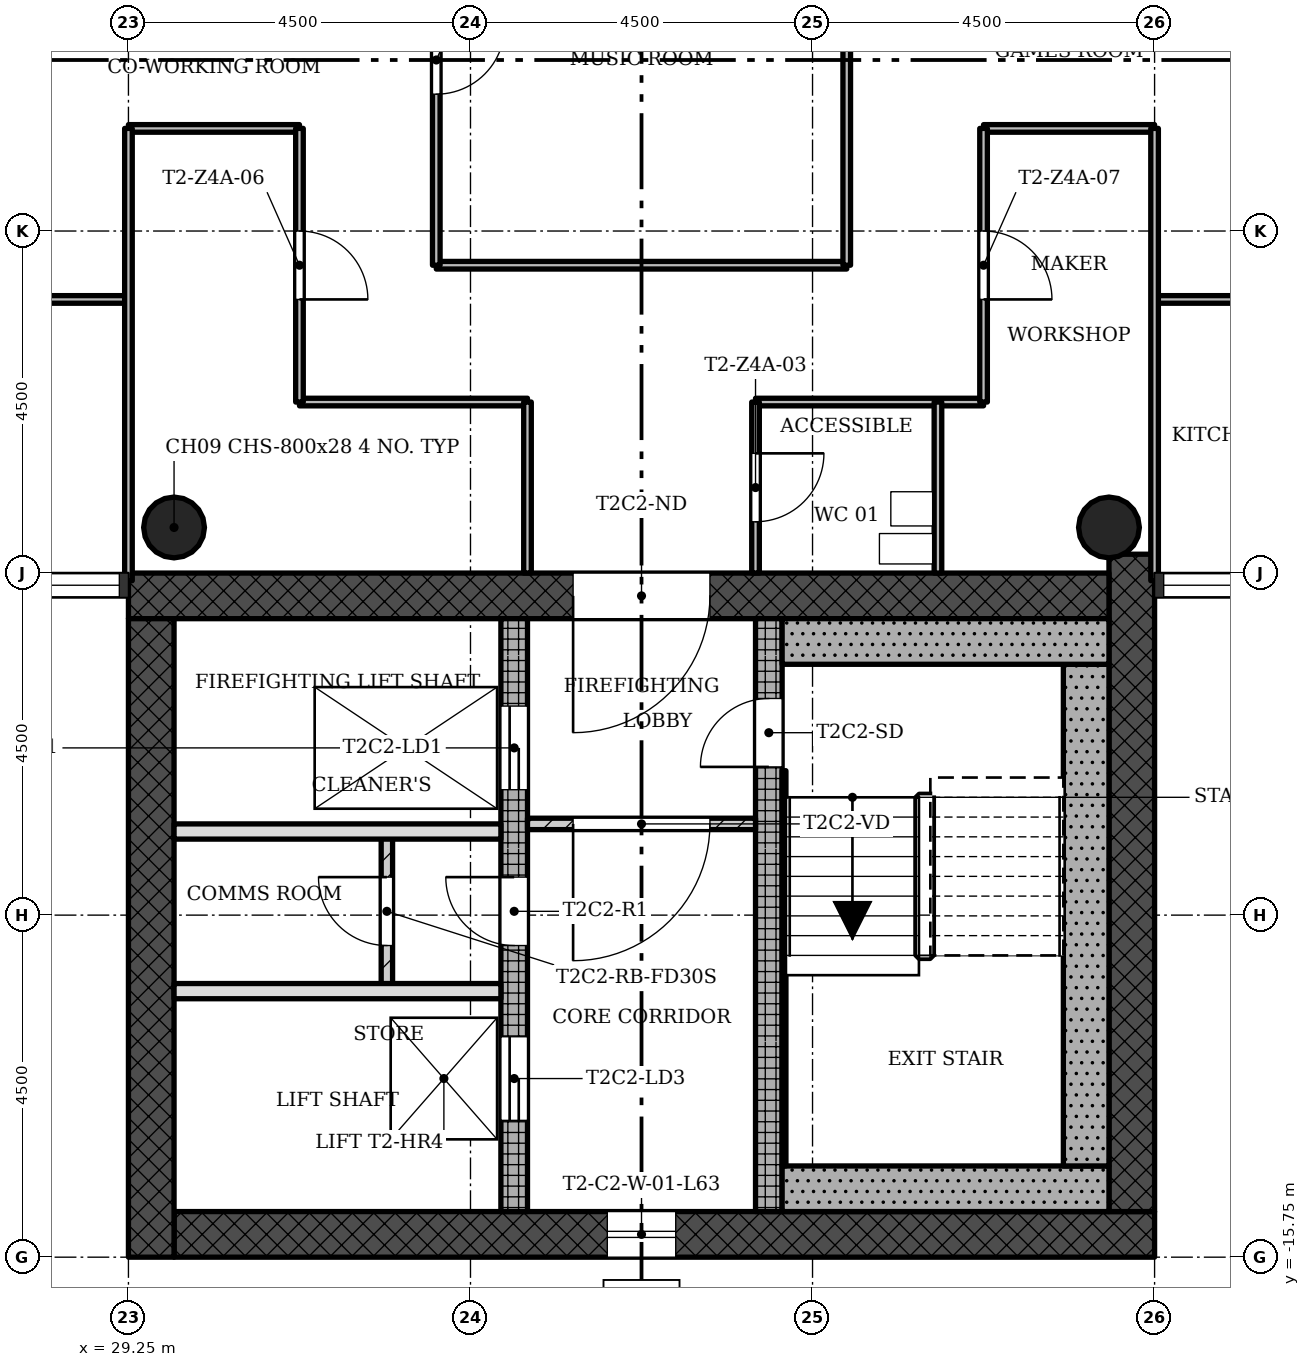
"""IFC4 building model, lengths in metres.
Left out: names, types, materials, properties, quantities, classifications, styles, units other than length and angle.
Written with IfcOpenShell. Run it as: python <this file> out.ifc"""

import sys

from ifc_helpers import new_model, si_unit, direction, frame, frame_2d, origin, origin_2d, place, context, subcontext, project, spatial, rectangle, hollow_circle, extrude, element, fill, save


model = new_model("IFC4")
c1 = context("Model", 3, precision=1e-05, world=origin(), true_north=direction((0.0, 1.0)))
c2 = subcontext(c1, "Body", "Model", "MODEL_VIEW")
j1 = project(units=[si_unit("LENGTHUNIT", "METRE"), si_unit("PLANEANGLEUNIT", "RADIAN")], contexts=[c1])
p1 = place(None, origin())
s1 = spatial("IfcSite", under=j1, at=p1, CompositionType="ELEMENT")
p2 = place(p1, origin())
s2 = spatial("IfcBuilding", under=s1, at=p2, CompositionType="ELEMENT")
p3 = place(p2, frame((0.0, 0.0, 226.6)))
s3 = spatial("IfcBuildingStorey", under=s2, at=p3, CompositionType="ELEMENT", Elevation=226.6)
p4 = place(p3, frame((29.85, -15.45, 0.0), z_axis=(0.0, 0.0, 1.0), x_axis=(1.0, 0.0, 0.0)))
e1 = element("IfcWall", 1, at=p4, inside=s3, PredefinedType="SHEAR", context=c2, shape_type="SweptSolid", body=[
    extrude(rectangle(XDim=12.9, YDim=0.6, at=frame_2d((6.45, 0.0))), origin(), (0.0, 0.0, 1.0), 3.4),
])
p5 = place(p4, frame((5.7, 0.0, 0.45)))
e2 = element("IfcOpeningElement", 2, at=p5, cuts=e1, PredefinedType="OPENING", context=c2, shape_type="SweptSolid", body=[
    extrude(rectangle(XDim=0.9, YDim=2.4, at=frame_2d((0.45, 1.2))), frame((0.0, 0.31, 0.0), z_axis=(0.0, -1.0, 0.0), x_axis=(1.0, 0.0, 0.0)), (0.0, 0.0, 1.0), 0.62),
])
p6 = place(p3, frame((42.45, -15.15, 0.0), z_axis=(0.0, 0.0, 1.0), x_axis=(0.0, 1.0, 0.0)))
e3 = element("IfcWall", 3, at=p6, inside=s3, PredefinedType="SHEAR", context=c2, shape_type="SweptSolid", body=[
    extrude(rectangle(XDim=8.648, YDim=0.6, at=frame_2d((4.324, 0.0))), origin(), (0.0, 0.0, 1.0), 3.4),
])
p7 = place(p3, frame((42.15, -7.05, 0.0), z_axis=(0.0, 0.0, 1.0), x_axis=(-1.0, 0.0, 0.0)))
e4 = element("IfcWall", 4, at=p7, inside=s3, PredefinedType="SHEAR", context=c2, shape_type="SweptSolid", body=[
    extrude(rectangle(XDim=12.9, YDim=0.6, at=frame_2d((6.45, 0.0))), origin(), (0.0, 0.0, 1.0), 3.4),
])
p8 = place(p7, frame((5.25, 0.0, 0.0)))
e5 = element("IfcOpeningElement", 5, at=p8, cuts=e4, PredefinedType="OPENING", context=c2, shape_type="SweptSolid", body=[
    extrude(rectangle(XDim=1.8, YDim=2.1, at=frame_2d((0.9, 1.05))), frame((0.0, 0.31, 0.0), z_axis=(0.0, -1.0, 0.0), x_axis=(1.0, 0.0, 0.0)), (0.0, 0.0, 1.0), 0.62),
])
p9 = place(p3, frame((29.55, -7.35, 0.0), z_axis=(0.0, 0.0, 1.0), x_axis=(0.0, -1.0, 0.0)))
e6 = element("IfcWall", 6, at=p9, inside=s3, PredefinedType="SHEAR", context=c2, shape_type="SweptSolid", body=[
    extrude(rectangle(XDim=8.4, YDim=0.6, at=frame_2d((4.2, 0.0))), origin(), (0.0, 0.0, 1.0), 3.4),
])
p10 = place(p3, frame((34.325, -15.15, 0.0), z_axis=(0.0, 0.0, 1.0), x_axis=(0.0, 1.0, 0.0)))
e7 = element("IfcWall", 7, at=p10, inside=s3, PredefinedType="SHEAR", context=c2, shape_type="SweptSolid", body=[
    extrude(rectangle(XDim=7.8, YDim=0.35, at=frame_2d((3.9, 0.0))), origin(), (0.0, 0.0, 1.0), 3.4),
])
p11 = place(p10, frame((5.55, 0.0, 0.0)))
e8 = element("IfcOpeningElement", 8, at=p11, cuts=e7, PredefinedType="OPENING", context=c2, shape_type="SweptSolid", body=[
    extrude(rectangle(XDim=1.1, YDim=2.1, at=frame_2d((0.55, 1.05))), frame((0.0, 0.185, 0.0), z_axis=(0.0, -1.0, 0.0), x_axis=(1.0, 0.0, 0.0)), (0.0, 0.0, 1.0), 0.37),
])
p12 = place(p10, frame((1.2, 0.0, 0.0)))
e9 = element("IfcOpeningElement", 9, at=p12, cuts=e7, PredefinedType="OPENING", context=c2, shape_type="SweptSolid", body=[
    extrude(rectangle(XDim=1.1, YDim=2.1, at=frame_2d((0.55, 1.05))), frame((0.0, 0.185, 0.0), z_axis=(0.0, -1.0, 0.0), x_axis=(1.0, 0.0, 0.0)), (0.0, 0.0, 1.0), 0.37),
])
p13 = place(p10, frame((3.5, 0.0, 0.0)))
e10 = element("IfcOpeningElement", 10, at=p13, cuts=e7, PredefinedType="OPENING", context=c2, shape_type="SweptSolid", body=[
    extrude(rectangle(XDim=0.9, YDim=2.1, at=frame_2d((0.45, 1.05))), frame((0.0, 0.185, 0.0), z_axis=(0.0, -1.0, 0.0), x_axis=(1.0, 0.0, 0.0)), (0.0, 0.0, 1.0), 0.37),
])
p14 = place(p3, frame((37.675, -15.15, 0.0), z_axis=(0.0, 0.0, 1.0), x_axis=(0.0, 1.0, 0.0)))
e11 = element("IfcWall", 11, at=p14, inside=s3, PredefinedType="SHEAR", context=c2, shape_type="SweptSolid", body=[
    extrude(rectangle(XDim=7.8, YDim=0.35, at=frame_2d((3.9, 0.0))), origin(), (0.0, 0.0, 1.0), 3.4),
])
p15 = place(p14, frame((5.85, 0.0, 0.0)))
e12 = element("IfcOpeningElement", 12, at=p15, cuts=e11, PredefinedType="OPENING", context=c2, shape_type="SweptSolid", body=[
    extrude(rectangle(XDim=0.9, YDim=2.1, at=frame_2d((0.45, 1.05))), frame((0.0, 0.185, 0.0), z_axis=(0.0, -1.0, 0.0), x_axis=(1.0, 0.0, 0.0)), (0.0, 0.0, 1.0), 0.37),
])
for number, where, z_axis, x_axis in (
    (13, (42.15, -6.15, 0.0), (0.0, 0.0, 1.0), (1.0, 0.0, 0.0)),
    (14, (29.85, -6.15, 0.0), (0.0, 0.0, 1.0), (1.0, 0.0, 0.0)),
):
    element("IfcColumn", number, at=place(p3, frame(where, z_axis=z_axis, x_axis=x_axis)), inside=s3, PredefinedType="COLUMN", context=c2, shape_type="SweptSolid", body=[
        extrude(hollow_circle(Radius=0.4, WallThickness=0.028, at=origin_2d()), origin(), (0.0, 0.0, 1.0), 3.4),
    ])
p16 = place(p3, frame((34.5, -10.05, 0.0), z_axis=(0.0, 0.0, 1.0), x_axis=(1.0, 0.0, 0.0)))
e15 = element("IfcWall", 15, at=p16, inside=s3, PredefinedType="PARTITIONING", context=c2, shape_type="SweptSolid", body=[
    extrude(rectangle(XDim=3.0, YDim=0.15, at=frame_2d((1.5, 0.0))), origin(), (0.0, 0.0, 1.0), 3.0),
])
p17 = place(p16, frame((0.6, 0.0, 0.0)))
e16 = element("IfcOpeningElement", 16, at=p17, cuts=e15, PredefinedType="OPENING", context=c2, shape_type="SweptSolid", body=[
    extrude(rectangle(XDim=1.8, YDim=2.1, at=frame_2d((0.9, 1.05))), frame((0.0, 0.085, 0.0), z_axis=(0.0, -1.0, 0.0), x_axis=(1.0, 0.0, 0.0)), (0.0, 0.0, 1.0), 0.17),
])
for number, where, z_axis, x_axis in (
    (17, (29.85, -12.25, 0.0), (0.0, 0.0, 1.0), (1.0, 0.0, 0.0)),
    (18, (29.85, -10.15, 0.0), (0.0, 0.0, 1.0), (1.0, 0.0, 0.0)),
):
    element("IfcWall", number, at=place(p3, frame(where, z_axis=z_axis, x_axis=x_axis)), inside=s3, PredefinedType="SOLIDWALL", context=c2, shape_type="SweptSolid", body=[
        extrude(rectangle(XDim=4.3, YDim=0.2, at=frame_2d((2.15, 0.0))), origin(), (0.0, 0.0, 1.0), 3.0),
    ])
p18 = place(p3, frame((32.65, -10.15, 0.0), z_axis=(0.0, 0.0, 1.0), x_axis=(0.0, -1.0, 0.0)))
e19 = element("IfcWall", 19, at=p18, inside=s3, PredefinedType="PARTITIONING", context=c2, shape_type="SweptSolid", body=[
    extrude(rectangle(XDim=2.1, YDim=0.15, at=frame_2d((1.05, 0.0))), origin(), (0.0, 0.0, 1.0), 3.0),
])
p19 = place(p18, frame((0.6, 0.0, 0.0)))
e20 = element("IfcOpeningElement", 20, at=p19, cuts=e19, PredefinedType="OPENING", context=c2, shape_type="SweptSolid", body=[
    extrude(rectangle(XDim=0.9, YDim=2.1, at=frame_2d((0.45, 1.05))), frame((0.0, 0.085, 0.0), z_axis=(0.0, -1.0, 0.0), x_axis=(1.0, 0.0, 0.0)), (0.0, 0.0, 1.0), 0.17),
])
for number, where, z_axis, x_axis in (
    (21, (40.5, -4.5, 0.0), (0.0, 0.0, 1.0), (-1.0, 0.0, 0.0)),
    (22, (34.5, -4.5, 0.0), (0.0, 0.0, 1.0), (-1.0, 0.0, 0.0)),
):
    element("IfcWall", number, at=place(p3, frame(where, z_axis=z_axis, x_axis=x_axis)), inside=s3, PredefinedType="PARTITIONING", context=c2, shape_type="SweptSolid", body=[
        extrude(rectangle(XDim=3.0, YDim=0.1, at=frame_2d((1.5, 0.0))), origin(), (0.0, 0.0, 1.0), 3.0),
    ])
p20 = place(p3, frame((47.25, -3.15, 0.0), z_axis=(0.0, 0.0, 1.0), x_axis=(-1.0, 0.0, 0.0)))
e23 = element("IfcWall", 23, at=p20, inside=s3, PredefinedType="PARTITIONING", context=c2, shape_type="SweptSolid", body=[
    extrude(rectangle(XDim=4.5, YDim=0.1, at=frame_2d((2.25, 0.0))), origin(), (0.0, 0.0, 1.0), 3.0),
])
p21 = place(p20, frame((1.8, 0.0, 0.0)))
e24 = element("IfcOpeningElement", 24, at=p21, cuts=e23, PredefinedType="OPENING", context=c2, shape_type="SweptSolid", body=[
    extrude(rectangle(XDim=0.9, YDim=2.1, at=frame_2d((0.45, 1.05))), frame((0.0, 0.06, 0.0), z_axis=(0.0, -1.0, 0.0), x_axis=(1.0, 0.0, 0.0)), (0.0, 0.0, 1.0), 0.12),
])
p22 = place(p3, frame((29.25, -3.15, 0.0), z_axis=(0.0, 0.0, 1.0), x_axis=(-1.0, 0.0, 0.0)))
e25 = element("IfcWall", 25, at=p22, inside=s3, PredefinedType="PARTITIONING", context=c2, shape_type="SweptSolid", body=[
    extrude(rectangle(XDim=9.0, YDim=0.1, at=frame_2d((4.5, 0.0))), origin(), (0.0, 0.0, 1.0), 3.0),
])
p23 = place(p22, frame((1.8, 0.0, 0.0)))
e26 = element("IfcOpeningElement", 26, at=p23, cuts=e25, PredefinedType="OPENING", context=c2, shape_type="SweptSolid", body=[
    extrude(rectangle(XDim=0.9, YDim=2.1, at=frame_2d((0.45, 1.05))), frame((0.0, 0.06, 0.0), z_axis=(0.0, -1.0, 0.0), x_axis=(1.0, 0.0, 0.0)), (0.0, 0.0, 1.0), 0.12),
])
p24 = place(p22, frame((6.3, 0.0, 0.0)))
e27 = element("IfcOpeningElement", 27, at=p24, cuts=e25, PredefinedType="OPENING", context=c2, shape_type="SweptSolid", body=[
    extrude(rectangle(XDim=0.9, YDim=2.1, at=frame_2d((0.45, 1.05))), frame((0.0, 0.06, 0.0), z_axis=(0.0, -1.0, 0.0), x_axis=(1.0, 0.0, 0.0)), (0.0, 0.0, 1.0), 0.12),
])
p25 = place(p3, frame((38.7, -2.7, 0.0), z_axis=(0.0, 0.0, 1.0), x_axis=(-1.0, 0.0, 0.0)))
e28 = element("IfcWall", 28, at=p25, inside=s3, PredefinedType="PARTITIONING", context=c2, shape_type="SweptSolid", body=[
    extrude(rectangle(XDim=5.4, YDim=0.1, at=frame_2d((2.7, 0.0))), origin(), (0.0, 0.0, 1.0), 3.0),
])
for number, where, z_axis, x_axis in (
    (29, (42.75, -0.9, 0.0), (0.0, 0.0, 1.0), (-1.0, 0.0, 0.0)),
    (30, (31.5, -0.9, 0.0), (0.0, 0.0, 1.0), (-1.0, 0.0, 0.0)),
):
    element("IfcWall", number, at=place(p3, frame(where, z_axis=z_axis, x_axis=x_axis)), inside=s3, PredefinedType="PARTITIONING", context=c2, shape_type="SweptSolid", body=[
        extrude(rectangle(XDim=2.25, YDim=0.1, at=frame_2d((1.125, 0.0))), origin(), (0.0, 0.0, 1.0), 3.0),
    ])
p26 = place(p3, frame((42.75, -6.85, 0.0), z_axis=(0.0, 0.0, 1.0), x_axis=(0.0, 1.0, 0.0)))
e31 = element("IfcWall", 31, at=p26, inside=s3, PredefinedType="PARTITIONING", context=c2, shape_type="SweptSolid", body=[
    extrude(rectangle(XDim=5.95, YDim=0.1, at=frame_2d((2.975, 0.0))), origin(), (0.0, 0.0, 1.0), 3.0),
])
p27 = place(p3, frame((40.5, -4.5, 0.0), z_axis=(0.0, 0.0, 1.0), x_axis=(0.0, 1.0, 0.0)))
e32 = element("IfcWall", 32, at=p27, inside=s3, PredefinedType="PARTITIONING", context=c2, shape_type="SweptSolid", body=[
    extrude(rectangle(XDim=3.6, YDim=0.1, at=frame_2d((1.8, 0.0))), origin(), (0.0, 0.0, 1.0), 3.0),
])
p28 = place(p27, frame((1.35, 0.0, 0.0)))
e33 = element("IfcOpeningElement", 33, at=p28, cuts=e32, PredefinedType="OPENING", context=c2, shape_type="SweptSolid", body=[
    extrude(rectangle(XDim=0.9, YDim=2.1, at=frame_2d((0.45, 1.05))), frame((0.0, 0.06, 0.0), z_axis=(0.0, -1.0, 0.0), x_axis=(1.0, 0.0, 0.0)), (0.0, 0.0, 1.0), 0.12),
])
p29 = place(p3, frame((39.9, -6.75, 0.0), z_axis=(0.0, 0.0, 1.0), x_axis=(0.0, 1.0, 0.0)))
e34 = element("IfcWall", 34, at=p29, inside=s3, PredefinedType="PARTITIONING", context=c2, shape_type="SweptSolid", body=[
    extrude(rectangle(XDim=2.25, YDim=0.1, at=frame_2d((1.125, 0.0))), origin(), (0.0, 0.0, 1.0), 3.0),
])
p30 = place(p3, frame((38.7, -2.7, 0.0), z_axis=(0.0, 0.0, 1.0), x_axis=(0.0, 1.0, 0.0)))
e35 = element("IfcWall", 35, at=p30, inside=s3, PredefinedType="PARTITIONING", context=c2, shape_type="SweptSolid", body=[
    extrude(rectangle(XDim=5.4, YDim=0.1, at=frame_2d((2.7, 0.0))), origin(), (0.0, 0.0, 1.0), 3.0),
])
p31 = place(p3, frame((37.5, -6.75, 0.0), z_axis=(0.0, 0.0, 1.0), x_axis=(0.0, 1.0, 0.0)))
e36 = element("IfcWall", 36, at=p31, inside=s3, PredefinedType="PARTITIONING", context=c2, shape_type="SweptSolid", body=[
    extrude(rectangle(XDim=2.25, YDim=0.1, at=frame_2d((1.125, 0.0))), origin(), (0.0, 0.0, 1.0), 3.0),
])
p32 = place(p31, frame((0.675, 0.0, 0.0)))
e37 = element("IfcOpeningElement", 37, at=p32, cuts=e36, PredefinedType="OPENING", context=c2, shape_type="SweptSolid", body=[
    extrude(rectangle(XDim=0.9, YDim=2.1, at=frame_2d((0.45, 1.05))), frame((0.0, 0.06, 0.0), z_axis=(0.0, -1.0, 0.0), x_axis=(1.0, 0.0, 0.0)), (0.0, 0.0, 1.0), 0.12),
])
p33 = place(p3, frame((34.5, -6.75, 0.0), z_axis=(0.0, 0.0, 1.0), x_axis=(0.0, 1.0, 0.0)))
e38 = element("IfcWall", 38, at=p33, inside=s3, PredefinedType="PARTITIONING", context=c2, shape_type="SweptSolid", body=[
    extrude(rectangle(XDim=2.25, YDim=0.1, at=frame_2d((1.125, 0.0))), origin(), (0.0, 0.0, 1.0), 3.0),
])
p34 = place(p3, frame((33.3, -2.7, 0.0), z_axis=(0.0, 0.0, 1.0), x_axis=(0.0, 1.0, 0.0)))
e39 = element("IfcWall", 39, at=p34, inside=s3, PredefinedType="PARTITIONING", context=c2, shape_type="SweptSolid", body=[
    extrude(rectangle(XDim=5.4, YDim=0.1, at=frame_2d((2.7, 0.0))), origin(), (0.0, 0.0, 1.0), 3.0),
])
p35 = place(p34, frame((2.25, 0.0, 0.0)))
e40 = element("IfcOpeningElement", 40, at=p35, cuts=e39, PredefinedType="OPENING", context=c2, shape_type="SweptSolid", body=[
    extrude(rectangle(XDim=0.9, YDim=2.1, at=frame_2d((0.45, 1.05))), frame((0.0, 0.06, 0.0), z_axis=(0.0, -1.0, 0.0), x_axis=(1.0, 0.0, 0.0)), (0.0, 0.0, 1.0), 0.12),
])
p36 = place(p3, frame((31.5, -4.5, 0.0), z_axis=(0.0, 0.0, 1.0), x_axis=(0.0, 1.0, 0.0)))
e41 = element("IfcWall", 41, at=p36, inside=s3, PredefinedType="PARTITIONING", context=c2, shape_type="SweptSolid", body=[
    extrude(rectangle(XDim=3.6, YDim=0.1, at=frame_2d((1.8, 0.0))), origin(), (0.0, 0.0, 1.0), 3.0),
])
p37 = place(p36, frame((1.35, 0.0, 0.0)))
e42 = element("IfcOpeningElement", 42, at=p37, cuts=e41, PredefinedType="OPENING", context=c2, shape_type="SweptSolid", body=[
    extrude(rectangle(XDim=0.9, YDim=2.1, at=frame_2d((0.45, 1.05))), frame((0.0, 0.06, 0.0), z_axis=(0.0, -1.0, 0.0), x_axis=(1.0, 0.0, 0.0)), (0.0, 0.0, 1.0), 0.12),
])
p38 = place(p3, frame((29.25, -6.85, 0.0), z_axis=(0.0, 0.0, 1.0), x_axis=(0.0, 1.0, 0.0)))
e43 = element("IfcWall", 43, at=p38, inside=s3, PredefinedType="PARTITIONING", context=c2, shape_type="SweptSolid", body=[
    extrude(rectangle(XDim=5.95, YDim=0.1, at=frame_2d((2.975, 0.0))), origin(), (0.0, 0.0, 1.0), 3.0),
])
p39 = place(p3, frame((37.85, -14.85, 0.0), z_axis=(0.0, 0.0, 1.0), x_axis=(1.0, 0.0, 0.0)))
e44 = element("IfcWall", 44, at=p39, inside=s3, PredefinedType="SHEAR", context=c2, shape_type="SweptSolid", body=[
    extrude(rectangle(XDim=4.3, YDim=0.6, at=frame_2d((2.15, 0.0))), origin(), (0.0, 0.0, 1.0), 3.4),
])
p40 = place(p3, frame((41.85, -7.95, 0.0), z_axis=(0.0, 0.0, 1.0), x_axis=(0.0, -1.0, 0.0)))
e45 = element("IfcWall", 45, at=p40, inside=s3, PredefinedType="SHEAR", context=c2, shape_type="SweptSolid", body=[
    extrude(rectangle(XDim=6.6, YDim=0.6, at=frame_2d((3.3, 0.0))), origin(), (0.0, 0.0, 1.0), 3.4),
])
p41 = place(p3, frame((37.85, -7.65, 0.0), z_axis=(0.0, 0.0, 1.0), x_axis=(1.0, 0.0, 0.0)))
e46 = element("IfcWall", 46, at=p41, inside=s3, PredefinedType="SHEAR", context=c2, shape_type="SweptSolid", body=[
    extrude(rectangle(XDim=4.3, YDim=0.6, at=frame_2d((2.15, 0.0))), origin(), (0.0, 0.0, 1.0), 3.4),
])
p42 = place(p3, frame((37.875, -9.35, 0.0), z_axis=(0.0, 0.0, 1.0), x_axis=(0.0, -1.0, 0.0)))
e47 = element("IfcWall", 47, at=p42, inside=s3, PredefinedType="SHEAR", context=c2, shape_type="SweptSolid", body=[
    extrude(rectangle(XDim=5.2, YDim=0.05, at=frame_2d((2.6, 0.0))), origin(), (0.0, 0.0, 1.0), 3.4),
])
p43 = place(p5, origin())
e48 = element("IfcWindow", 48, at=p43, inside=s3, PartitioningType="SINGLE_PANEL", PredefinedType="WINDOW", context=c2, shape_type="SweptSolid", body=[
    extrude(rectangle(XDim=0.9, YDim=2.4, at=frame_2d((0.45, 1.2))), frame((0.0, 0.03, 0.0), z_axis=(0.0, -1.0, 0.0), x_axis=(1.0, 0.0, 0.0)), (0.0, 0.0, 1.0), 0.06),
])
fill(e2, e48)
p44 = place(p17, origin())
e49 = element("IfcDoor", 49, at=p44, inside=s3, OperationType="SINGLE_SWING_LEFT", PredefinedType="DOOR", context=c2, shape_type="SweptSolid", body=[
    extrude(rectangle(XDim=1.8, YDim=2.1, at=frame_2d((0.9, 1.05))), frame((0.0, 0.025, 0.0), z_axis=(0.0, -1.0, 0.0), x_axis=(1.0, 0.0, 0.0)), (0.0, 0.0, 1.0), 0.05),
])
fill(e16, e49)
p45 = place(p19, origin())
e50 = element("IfcDoor", 50, at=p45, inside=s3, OperationType="SINGLE_SWING_LEFT", PredefinedType="DOOR", context=c2, shape_type="SweptSolid", body=[
    extrude(rectangle(XDim=0.9, YDim=2.1, at=frame_2d((0.45, 1.05))), frame((0.0, 0.025, 0.0), z_axis=(0.0, -1.0, 0.0), x_axis=(1.0, 0.0, 0.0)), (0.0, 0.0, 1.0), 0.05),
])
fill(e20, e50)
p46 = place(p35, origin())
e51 = element("IfcDoor", 51, at=p46, inside=s3, OperationType="SINGLE_SWING_RIGHT", PredefinedType="DOOR", context=c2, shape_type="SweptSolid", body=[
    extrude(rectangle(XDim=0.9, YDim=2.1, at=frame_2d((0.45, 1.05))), frame((0.0, 0.025, 0.0), z_axis=(0.0, -1.0, 0.0), x_axis=(1.0, 0.0, 0.0)), (0.0, 0.0, 1.0), 0.05),
])
fill(e40, e51)
p47 = place(p32, origin())
e52 = element("IfcDoor", 52, at=p47, inside=s3, OperationType="SINGLE_SWING_RIGHT", PredefinedType="DOOR", context=c2, shape_type="SweptSolid", body=[
    extrude(rectangle(XDim=0.9, YDim=2.1, at=frame_2d((0.45, 1.05))), frame((0.0, 0.025, 0.0), z_axis=(0.0, -1.0, 0.0), x_axis=(1.0, 0.0, 0.0)), (0.0, 0.0, 1.0), 0.05),
])
fill(e37, e52)
p48 = place(p37, origin())
e53 = element("IfcDoor", 53, at=p48, inside=s3, OperationType="SINGLE_SWING_LEFT", PredefinedType="DOOR", context=c2, shape_type="SweptSolid", body=[
    extrude(rectangle(XDim=0.9, YDim=2.1, at=frame_2d((0.45, 1.05))), frame((0.0, 0.025, 0.0), z_axis=(0.0, -1.0, 0.0), x_axis=(1.0, 0.0, 0.0)), (0.0, 0.0, 1.0), 0.05),
])
fill(e42, e53)
p49 = place(p28, origin())
e54 = element("IfcDoor", 54, at=p49, inside=s3, OperationType="SINGLE_SWING_LEFT", PredefinedType="DOOR", context=c2, shape_type="SweptSolid", body=[
    extrude(rectangle(XDim=0.9, YDim=2.1, at=frame_2d((0.45, 1.05))), frame((0.0, 0.025, 0.0), z_axis=(0.0, -1.0, 0.0), x_axis=(1.0, 0.0, 0.0)), (0.0, 0.0, 1.0), 0.05),
])
fill(e33, e54)
p50 = place(p15, origin())
e55 = element("IfcDoor", 55, at=p50, inside=s3, OperationType="SINGLE_SWING_RIGHT", PredefinedType="DOOR", context=c2, shape_type="SweptSolid", body=[
    extrude(rectangle(XDim=0.9, YDim=2.1, at=frame_2d((0.45, 1.05))), frame((0.0, 0.025, 0.0), z_axis=(0.0, -1.0, 0.0), x_axis=(1.0, 0.0, 0.0)), (0.0, 0.0, 1.0), 0.05),
])
fill(e12, e55)
p51 = place(p11, origin())
e56 = element("IfcDoor", 56, at=p51, inside=s3, OperationType="SLIDING_TO_LEFT", PredefinedType="DOOR", context=c2, shape_type="SweptSolid", body=[
    extrude(rectangle(XDim=1.1, YDim=2.1, at=frame_2d((0.55, 1.05))), frame((0.0, 0.025, 0.0), z_axis=(0.0, -1.0, 0.0), x_axis=(1.0, 0.0, 0.0)), (0.0, 0.0, 1.0), 0.05),
])
fill(e8, e56)
p52 = place(p12, origin())
e57 = element("IfcDoor", 57, at=p52, inside=s3, OperationType="SLIDING_TO_LEFT", PredefinedType="DOOR", context=c2, shape_type="SweptSolid", body=[
    extrude(rectangle(XDim=1.1, YDim=2.1, at=frame_2d((0.55, 1.05))), frame((0.0, 0.025, 0.0), z_axis=(0.0, -1.0, 0.0), x_axis=(1.0, 0.0, 0.0)), (0.0, 0.0, 1.0), 0.05),
])
fill(e9, e57)
p53 = place(p13, origin())
e58 = element("IfcDoor", 58, at=p53, inside=s3, OperationType="SINGLE_SWING_LEFT", PredefinedType="DOOR", context=c2, shape_type="SweptSolid", body=[
    extrude(rectangle(XDim=0.9, YDim=2.1, at=frame_2d((0.45, 1.05))), frame((0.0, 0.025, 0.0), z_axis=(0.0, -1.0, 0.0), x_axis=(1.0, 0.0, 0.0)), (0.0, 0.0, 1.0), 0.05),
])
fill(e10, e58)
p54 = place(p8, origin())
e59 = element("IfcDoor", 59, at=p54, inside=s3, OperationType="SINGLE_SWING_LEFT", PredefinedType="DOOR", context=c2, shape_type="SweptSolid", body=[
    extrude(rectangle(XDim=1.8, YDim=2.1, at=frame_2d((0.9, 1.05))), frame((0.0, 0.025, 0.0), z_axis=(0.0, -1.0, 0.0), x_axis=(1.0, 0.0, 0.0)), (0.0, 0.0, 1.0), 0.05),
])
fill(e5, e59)
save(model, sys.argv[1])
